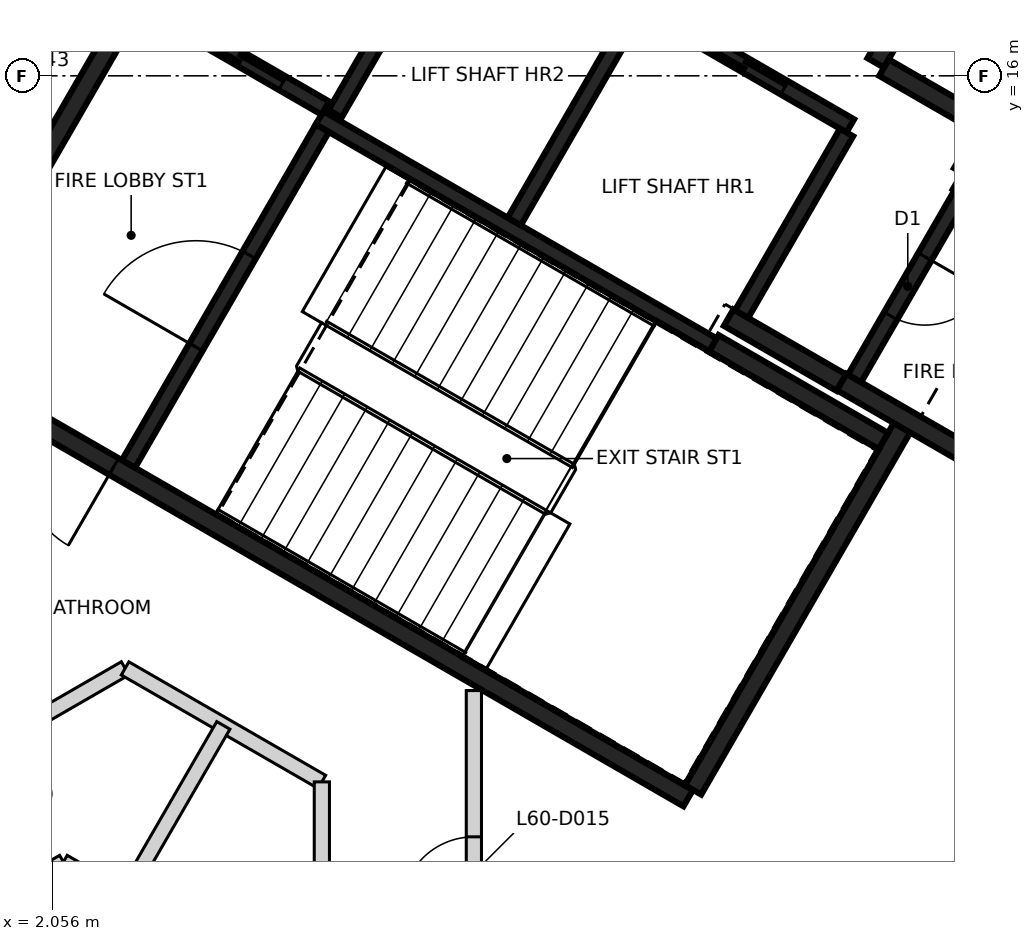
"""IFC4 building model, lengths in metres.
Left out: names, types, materials, properties, quantities, classifications, styles, units other than length and angle.
Written with IfcOpenShell. Run it as: python <this file> out.ifc"""

import sys

from ifc_helpers import new_model, si_unit, direction, frame, frame_2d, origin, place, context, subcontext, project, spatial, rectangle, extrude, element, fill, save


model = new_model("IFC4")
c1 = context("Model", 3, precision=1e-05, world=origin(), true_north=direction((0.0, 1.0)))
c2 = subcontext(c1, "Body", "Model", "MODEL_VIEW")
j1 = project(units=[si_unit("LENGTHUNIT", "METRE"), si_unit("PLANEANGLEUNIT", "RADIAN")], contexts=[c1])
p1 = place(None, origin())
s1 = spatial("IfcSite", under=j1, at=p1, CompositionType="ELEMENT")
p2 = place(p1, origin())
s2 = spatial("IfcBuilding", under=s1, at=p2, CompositionType="ELEMENT")
p3 = place(p2, frame((0.0, 0.0, 239.4)))
s3 = spatial("IfcBuildingStorey", under=s2, at=p3, CompositionType="ELEMENT", Elevation=239.4)
p4 = place(p3, frame((10.42, 6.498, 0.0), z_axis=(0.0, 0.0, 1.0), x_axis=(-0.866021906294, 0.500006057782, 0.0)))
e1 = element("IfcWall", 1, at=p4, inside=s3, PredefinedType="SHEAR", context=c2, shape_type="SweptSolid", body=[
    extrude(rectangle(XDim=11.55, YDim=0.25, at=frame_2d((5.775, 0.0))), origin(), (0.0, 0.0, 1.0), 3.25),
])
p5 = place(p4, frame((10.025, 0.0, 0.0)))
e2 = element("IfcOpeningElement", 2, at=p5, cuts=e1, PredefinedType="OPENING", context=c2, shape_type="SweptSolid", body=[
    extrude(rectangle(XDim=1.2, YDim=2.1, at=frame_2d((0.6, 1.05))), frame((0.0, 0.135, 0.0), z_axis=(0.0, -1.0, 0.0), x_axis=(1.0, 0.0, 0.0)), (0.0, 0.0, 1.0), 0.27),
])
p6 = place(p4, frame((8.725, 0.0, 0.0)))
e3 = element("IfcOpeningElement", 3, at=p6, cuts=e1, PredefinedType="OPENING", context=c2, shape_type="SweptSolid", body=[
    extrude(rectangle(XDim=1.2, YDim=2.1, at=frame_2d((0.6, 1.05))), frame((0.0, 0.135, 0.0), z_axis=(0.0, -1.0, 0.0), x_axis=(1.0, 0.0, 0.0)), (0.0, 0.0, 1.0), 0.27),
])
p7 = place(p3, frame((0.48, 12.381, 0.0), z_axis=(0.0, 0.0, 1.0), x_axis=(0.49999885962, 0.866026062182, 0.0)))
e4 = element("IfcWall", 4, at=p7, inside=s3, PredefinedType="SHEAR", context=c2, shape_type="SweptSolid", body=[
    extrude(rectangle(XDim=5.225, YDim=0.25, at=frame_2d((2.612, 0.0))), origin(), (0.0, 0.0, 1.0), 3.25),
])
p8 = place(p3, frame((13.238, 11.378, 0.0), z_axis=(0.0, 0.0, 1.0), x_axis=(-0.500008851346, -0.866020293397, 0.0)))
e5 = element("IfcWall", 5, at=p8, inside=s3, PredefinedType="SHEAR", context=c2, shape_type="SweptSolid", body=[
    extrude(rectangle(XDim=5.51, YDim=0.25, at=frame_2d((2.755, 0.0))), origin(), (0.0, 0.0, 1.0), 3.25),
])
p9 = place(p3, frame((14.918, 10.54, 0.0), z_axis=(0.0, 0.0, 1.0), x_axis=(-0.866063538972, 0.499933942099, 0.0)))
e6 = element("IfcWall", 6, at=p9, inside=s3, PredefinedType="SHEAR", context=c2, shape_type="SweptSolid", body=[
    extrude(rectangle(XDim=2.865, YDim=0.25, at=frame_2d((1.432, 0.0))), origin(), (0.0, 0.0, 1.0), 3.25),
])
p10 = place(p3, frame((13.963, 14.614, 0.0), z_axis=(0.0, 0.0, 1.0), x_axis=(0.866042235819, -0.499970844928, 0.0)))
e7 = element("IfcWall", 7, at=p10, inside=s3, PredefinedType="SHEAR", context=c2, shape_type="SweptSolid", body=[
    extrude(rectangle(XDim=2.865, YDim=0.25, at=frame_2d((1.432, 0.0))), origin(), (0.0, 0.0, 1.0), 3.25),
])
p11 = place(p3, frame((10.757, 12.481, 0.0), z_axis=(0.0, 0.0, 1.0), x_axis=(0.866022940537, -0.500004266446, 0.0)))
e8 = element("IfcWall", 8, at=p11, inside=s3, PredefinedType="SHEAR", context=c2, shape_type="SweptSolid", body=[
    extrude(rectangle(XDim=2.575, YDim=0.25, at=frame_2d((1.287, 0.0))), origin(), (0.0, 0.0, 1.0), 3.25),
])
p12 = place(p3, frame((13.819, 17.785, 0.0), z_axis=(0.0, 0.0, 1.0), x_axis=(-0.500039802285, -0.866002422705, 0.0)))
e9 = element("IfcWall", 9, at=p12, inside=s3, PredefinedType="SHEAR", context=c2, shape_type="SweptSolid", body=[
    extrude(rectangle(XDim=1.865, YDim=0.25, at=frame_2d((0.932, 0.0))), origin(), (0.0, 0.0, 1.0), 3.25),
])
p13 = place(p3, frame((12.433, 11.964, 0.0), z_axis=(0.0, 0.0, 1.0), x_axis=(-0.866038183914, 0.499977863513, 0.0)))
e10 = element("IfcWall", 10, at=p13, inside=s3, PredefinedType="SHEAR", context=c2, shape_type="SweptSolid", body=[
    extrude(rectangle(XDim=1.71, YDim=0.25, at=frame_2d((0.855, 0.0))), origin(), (0.0, 0.0, 1.0), 3.25),
])
p14 = place(p3, frame((12.995, 16.108, 0.0), z_axis=(0.0, 0.0, 1.0), x_axis=(0.866044474677, -0.49996696679, 0.0)))
e11 = element("IfcWall", 11, at=p14, inside=s3, PredefinedType="SHEAR", context=c2, shape_type="SweptSolid", body=[
    extrude(rectangle(XDim=1.584, YDim=0.25, at=frame_2d((0.792, 0.0))), origin(), (0.0, 0.0, 1.0), 3.25),
])
p15 = place(p3, frame((14.305, 15.207, 0.0), z_axis=(0.0, 0.0, 1.0), x_axis=(-0.499848422343, -0.866112899501, 0.0)))
e12 = element("IfcWall", 12, at=p15, inside=s3, PredefinedType="SHEAR", context=c2, shape_type="SweptSolid", body=[
    extrude(rectangle(XDim=0.559, YDim=0.25, at=frame_2d((0.28, 0.0))), origin(), (0.0, 0.0, 1.0), 3.25),
])
p16 = place(p3, frame((12.552, 15.342, 0.0), z_axis=(0.0, 0.0, 1.0), x_axis=(-0.866030299012, 0.499991521122, 0.0)))
e13 = element("IfcWall", 13, at=p16, inside=s3, PredefinedType="SHEAR", context=c2, shape_type="SweptSolid", body=[
    extrude(rectangle(XDim=6.1, YDim=0.2, at=frame_2d((3.05, 0.0))), origin(), (0.0, 0.0, 1.0), 3.25),
])
p17 = place(p16, frame((1.0, 0.0, 0.0)))
e14 = element("IfcOpeningElement", 14, at=p17, cuts=e13, PredefinedType="OPENING", context=c2, shape_type="SweptSolid", body=[
    extrude(rectangle(XDim=1.2, YDim=2.1, at=frame_2d((0.6, 1.05))), frame((0.0, 0.11, 0.0), z_axis=(0.0, -1.0, 0.0), x_axis=(1.0, 0.0, 0.0)), (0.0, 0.0, 1.0), 0.22),
])
p18 = place(p16, frame((3.982, 0.0, 0.0)))
e15 = element("IfcOpeningElement", 15, at=p18, cuts=e13, PredefinedType="OPENING", context=c2, shape_type="SweptSolid", body=[
    extrude(rectangle(XDim=1.2, YDim=2.1, at=frame_2d((0.6, 1.05))), frame((0.0, 0.11, 0.0), z_axis=(0.0, -1.0, 0.0), x_axis=(1.0, 0.0, 0.0)), (0.0, 0.0, 1.0), 0.22),
])
p19 = place(p3, frame((10.743, 12.46, 0.0), z_axis=(0.0, 0.0, 1.0), x_axis=(-0.866018848283, 0.500011354289, 0.0)))
e16 = element("IfcWall", 16, at=p19, inside=s3, PredefinedType="SHEAR", context=c2, shape_type="SweptSolid", body=[
    extrude(rectangle(XDim=5.974, YDim=0.2, at=frame_2d((2.987, 0.0))), origin(), (0.0, 0.0, 1.0), 3.25),
])
p20 = place(p3, frame((3.057, 10.895, 0.0), z_axis=(0.0, 0.0, 1.0), x_axis=(0.500027839223, 0.866009330205, 0.0)))
e17 = element("IfcWall", 17, at=p20, inside=s3, PredefinedType="SHEAR", context=c2, shape_type="SweptSolid", body=[
    extrude(rectangle(XDim=5.098, YDim=0.2, at=frame_2d((2.549, 0.0))), origin(), (0.0, 0.0, 1.0), 3.25),
])
p21 = place(p20, frame((1.774, 0.0, 0.0)))
e18 = element("IfcOpeningElement", 18, at=p21, cuts=e17, PredefinedType="OPENING", context=c2, shape_type="SweptSolid", body=[
    extrude(rectangle(XDim=1.4, YDim=2.1, at=frame_2d((0.7, 1.05))), frame((0.0, 0.11, 0.0), z_axis=(0.0, -1.0, 0.0), x_axis=(1.0, 0.0, 0.0)), (0.0, 0.0, 1.0), 0.22),
])
p22 = place(p3, frame((8.132, 14.084, 0.0), z_axis=(0.0, 0.0, 1.0), x_axis=(0.500030834389, 0.86600760081, 0.0)))
e19 = element("IfcWall", 19, at=p22, inside=s3, PredefinedType="SHEAR", context=c2, shape_type="SweptSolid", body=[
    extrude(rectangle(XDim=3.198, YDim=0.2, at=frame_2d((1.599, 0.0))), origin(), (0.0, 0.0, 1.0), 3.25),
])
p23 = place(p3, frame((14.008, 14.442, 0.0), z_axis=(0.0, 0.0, 1.0), x_axis=(-0.499986818241, -0.866033014143, 0.0)))
e20 = element("IfcWall", 20, at=p23, inside=s3, PredefinedType="SHEAR", context=c2, shape_type="SweptSolid", body=[
    extrude(rectangle(XDim=2.798, YDim=0.2, at=frame_2d((1.399, 0.0))), origin(), (0.0, 0.0, 1.0), 3.25),
])
p24 = place(p23, frame((0.949, 0.0, 0.0)))
e21 = element("IfcOpeningElement", 21, at=p24, cuts=e20, PredefinedType="OPENING", context=c2, shape_type="SweptSolid", body=[
    extrude(rectangle(XDim=0.9, YDim=2.1, at=frame_2d((0.45, 1.05))), frame((0.0, 0.11, 0.0), z_axis=(0.0, -1.0, 0.0), x_axis=(1.0, 0.0, 0.0)), (0.0, 0.0, 1.0), 0.22),
])
p25 = place(p3, frame((12.502, 15.255, 0.0), z_axis=(0.0, 0.0, 1.0), x_axis=(-0.499965018551, -0.866045599391, 0.0)))
e22 = element("IfcWall", 22, at=p25, inside=s3, PredefinedType="SHEAR", context=c2, shape_type="SweptSolid", body=[
    extrude(rectangle(XDim=2.759, YDim=0.2, at=frame_2d((1.379, 0.0))), origin(), (0.0, 0.0, 1.0), 3.25),
])
p26 = place(p3, frame((7.324, 18.187, 0.0), z_axis=(0.0, 0.0, 1.0), x_axis=(-0.499967891604, -0.866043940782, 0.0)))
e23 = element("IfcWall", 23, at=p26, inside=s3, PredefinedType="SHEAR", context=c2, shape_type="SweptSolid", body=[
    extrude(rectangle(XDim=3.1, YDim=0.2, at=frame_2d((1.55, 0.0))), origin(), (0.0, 0.0, 1.0), 3.25),
])
p27 = place(p3, frame((5.646, 15.576, 0.0), z_axis=(0.0, 0.0, 1.0), x_axis=(-0.866018407898, 0.500012117035, 0.0)))
e24 = element("IfcWall", 24, at=p27, inside=s3, PredefinedType="SHEAR", context=c2, shape_type="SweptSolid", body=[
    extrude(rectangle(XDim=2.651, YDim=0.2, at=frame_2d((1.325, 0.0))), origin(), (0.0, 0.0, 1.0), 3.25),
])
p28 = place(p27, frame((0.652, 0.0, 0.0)))
e25 = element("IfcOpeningElement", 25, at=p28, cuts=e24, PredefinedType="OPENING", context=c2, shape_type="SweptSolid", body=[
    extrude(rectangle(XDim=1.3, YDim=2.1, at=frame_2d((0.65, 1.05))), frame((0.0, 0.11, 0.0), z_axis=(0.0, -1.0, 0.0), x_axis=(1.0, 0.0, 0.0)), (0.0, 0.0, 1.0), 0.22),
])
p29 = place(p3, frame((-8.612, 1.494, 0.0), z_axis=(0.0, 0.0, 1.0), x_axis=(0.8660441356, 0.49996755414, 0.0)))
e26 = element("IfcWall", 26, at=p29, inside=s3, PredefinedType="PARTITIONING", context=c2, shape_type="SweptSolid", body=[
    extrude(rectangle(XDim=13.422, YDim=0.2, at=frame_2d((6.711, 0.0))), origin(), (0.0, 0.0, 1.0), 3.25),
])
p30 = place(p29, frame((9.611, 0.0, 0.0)))
e27 = element("IfcOpeningElement", 27, at=p30, cuts=e26, PredefinedType="OPENING", context=c2, shape_type="SweptSolid", body=[
    extrude(rectangle(XDim=0.9, YDim=2.1, at=frame_2d((0.45, 1.05))), frame((0.0, 0.11, 0.0), z_axis=(0.0, -1.0, 0.0), x_axis=(1.0, 0.0, 0.0)), (0.0, 0.0, 1.0), 0.22),
])
p31 = place(p29, frame((2.911, 0.0, 0.0)))
e28 = element("IfcOpeningElement", 28, at=p31, cuts=e26, PredefinedType="OPENING", context=c2, shape_type="SweptSolid", body=[
    extrude(rectangle(XDim=0.9, YDim=2.1, at=frame_2d((0.45, 1.05))), frame((0.0, 0.11, 0.0), z_axis=(0.0, -1.0, 0.0), x_axis=(1.0, 0.0, 0.0)), (0.0, 0.0, 1.0), 0.22),
])
p32 = place(p3, frame((-1.084, 12.65, 0.0), z_axis=(0.0, 0.0, 1.0), x_axis=(0.492373019537, 0.87038428848, 0.0)))
e29 = element("IfcWall", 29, at=p32, inside=s3, PredefinedType="PARTITIONING", context=c2, shape_type="SweptSolid", body=[
    extrude(rectangle(XDim=8.738, YDim=0.2, at=frame_2d((4.369, 0.0))), origin(), (0.0, 0.0, 1.0), 3.25),
])
p33 = place(p32, frame((5.23, 0.0, 0.0)))
e30 = element("IfcOpeningElement", 30, at=p33, cuts=e29, PredefinedType="OPENING", context=c2, shape_type="SweptSolid", body=[
    extrude(rectangle(XDim=1.0, YDim=2.1, at=frame_2d((0.5, 1.05))), frame((0.0, 0.11, 0.0), z_axis=(0.0, -1.0, 0.0), x_axis=(1.0, 0.0, 0.0)), (0.0, 0.0, 1.0), 0.22),
])
p34 = place(p3, frame((3.011, 8.204, 0.0), z_axis=(0.0, 0.0, 1.0), x_axis=(0.86628077395, -0.499557424812, 0.0)))
e31 = element("IfcWall", 31, at=p34, inside=s3, PredefinedType="PARTITIONING", context=c2, shape_type="SweptSolid", body=[
    extrude(rectangle(XDim=2.989, YDim=0.2, at=frame_2d((1.494, 0.0))), origin(), (0.0, 0.0, 1.0), 3.25),
])
p35 = place(p3, frame((5.6, -6.711, 0.0), z_axis=(0.0, 0.0, 1.0), x_axis=(0.0, 1.0, 0.0)))
e32 = element("IfcWall", 32, at=p35, inside=s3, PredefinedType="PARTITIONING", context=c2, shape_type="SweptSolid", body=[
    extrude(rectangle(XDim=13.422, YDim=0.2, at=frame_2d((6.711, 0.0))), origin(), (0.0, 0.0, 1.0), 3.25),
])
p36 = place(p35, frame((2.912, 0.0, 0.0)))
e33 = element("IfcOpeningElement", 33, at=p36, cuts=e32, PredefinedType="OPENING", context=c2, shape_type="SweptSolid", body=[
    extrude(rectangle(XDim=0.9, YDim=2.1, at=frame_2d((0.45, 1.05))), frame((0.0, 0.11, 0.0), z_axis=(0.0, -1.0, 0.0), x_axis=(1.0, 0.0, 0.0)), (0.0, 0.0, 1.0), 0.22),
])
p37 = place(p35, frame((9.611, 0.0, 0.0)))
e34 = element("IfcOpeningElement", 34, at=p37, cuts=e32, PredefinedType="OPENING", context=c2, shape_type="SweptSolid", body=[
    extrude(rectangle(XDim=0.9, YDim=2.1, at=frame_2d((0.45, 1.05))), frame((0.0, 0.11, 0.0), z_axis=(0.0, -1.0, 0.0), x_axis=(1.0, 0.0, 0.0)), (0.0, 0.0, 1.0), 0.22),
])
p38 = place(p3, frame((7.6, -4.966, 0.0), z_axis=(0.0, 0.0, 1.0), x_axis=(0.0, 1.0, 0.0)))
e35 = element("IfcWall", 35, at=p38, inside=s3, PredefinedType="PARTITIONING", context=c2, shape_type="SweptSolid", body=[
    extrude(rectangle(XDim=12.878, YDim=0.2, at=frame_2d((6.439, 0.0))), origin(), (0.0, 0.0, 1.0), 3.25),
])
p39 = place(p38, frame((10.004, 0.0, 0.0)))
e36 = element("IfcOpeningElement", 36, at=p39, cuts=e35, PredefinedType="OPENING", context=c2, shape_type="SweptSolid", body=[
    extrude(rectangle(XDim=0.95, YDim=2.1, at=frame_2d((0.475, 1.05))), frame((0.0, 0.11, 0.0), z_axis=(0.0, -1.0, 0.0), x_axis=(1.0, 0.0, 0.0)), (0.0, 0.0, 1.0), 0.22),
])
p40 = place(p3, frame((-6.0, 0.924, 0.0), z_axis=(0.0, 0.0, 1.0), x_axis=(0.866012967051, 0.500021540435, 0.0)))
e37 = element("IfcWall", 37, at=p40, inside=s3, PredefinedType="PARTITIONING", context=c2, shape_type="SweptSolid", body=[
    extrude(rectangle(XDim=9.468, YDim=0.2, at=frame_2d((4.734, 0.0))), origin(), (0.0, 0.0, 1.0), 3.25),
])
p41 = place(p3, frame((2.2, 5.658, 0.0), z_axis=(0.0, 0.0, 1.0), x_axis=(0.865818011038, -0.500359042851, 0.0)))
e38 = element("IfcWall", 38, at=p41, inside=s3, PredefinedType="PARTITIONING", context=c2, shape_type="SweptSolid", body=[
    extrude(rectangle(XDim=1.848, YDim=0.2, at=frame_2d((0.924, 0.0))), origin(), (0.0, 0.0, 1.0), 3.25),
])
p42 = place(p3, frame((3.0, 5.196, 0.0), z_axis=(0.0, 0.0, 1.0), x_axis=(0.500076354988, 0.865981315724, 0.0)))
e39 = element("IfcWall", 39, at=p42, inside=s3, PredefinedType="PARTITIONING", context=c2, shape_type="SweptSolid", body=[
    extrude(rectangle(XDim=2.607, YDim=0.2, at=frame_2d((1.304, 0.0))), origin(), (0.0, 0.0, 1.0), 3.25),
])
p43 = place(p28, origin())
e40 = element("IfcDoor", 40, at=p43, inside=s3, OperationType="SLIDING_TO_LEFT", PredefinedType="DOOR", context=c2, shape_type="SweptSolid", body=[
    extrude(rectangle(XDim=1.3, YDim=2.1, at=frame_2d((0.65, 1.05))), frame((0.0, 0.025, 0.0), z_axis=(0.0, -1.0, 0.0), x_axis=(1.0, 0.0, 0.0)), (0.0, 0.0, 1.0), 0.05),
])
fill(e25, e40)
p44 = place(p17, origin())
e41 = element("IfcDoor", 41, at=p44, inside=s3, OperationType="DOUBLE_DOOR_SLIDING", PredefinedType="DOOR", context=c2, shape_type="SweptSolid", body=[
    extrude(rectangle(XDim=1.2, YDim=2.1, at=frame_2d((0.6, 1.05))), frame((0.0, 0.025, 0.0), z_axis=(0.0, -1.0, 0.0), x_axis=(1.0, 0.0, 0.0)), (0.0, 0.0, 1.0), 0.05),
])
fill(e14, e41)
p45 = place(p6, origin())
e42 = element("IfcDoor", 42, at=p45, inside=s3, OperationType="SINGLE_SWING_RIGHT", PredefinedType="DOOR", context=c2, shape_type="SweptSolid", body=[
    extrude(rectangle(XDim=1.2, YDim=2.1, at=frame_2d((0.6, 1.05))), frame((0.0, 0.025, 0.0), z_axis=(0.0, -1.0, 0.0), x_axis=(1.0, 0.0, 0.0)), (0.0, 0.0, 1.0), 0.05),
])
fill(e3, e42)
p46 = place(p21, origin())
e43 = element("IfcDoor", 43, at=p46, inside=s3, OperationType="SINGLE_SWING_LEFT", PredefinedType="DOOR", context=c2, shape_type="SweptSolid", body=[
    extrude(rectangle(XDim=1.4, YDim=2.1, at=frame_2d((0.7, 1.05))), frame((0.0, 0.025, 0.0), z_axis=(0.0, -1.0, 0.0), x_axis=(1.0, 0.0, 0.0)), (0.0, 0.0, 1.0), 0.05),
])
fill(e18, e43)
p47 = place(p24, origin())
e44 = element("IfcDoor", 44, at=p47, inside=s3, OperationType="SINGLE_SWING_RIGHT", PredefinedType="DOOR", context=c2, shape_type="SweptSolid", body=[
    extrude(rectangle(XDim=0.9, YDim=2.1, at=frame_2d((0.45, 1.05))), frame((0.0, 0.025, 0.0), z_axis=(0.0, -1.0, 0.0), x_axis=(1.0, 0.0, 0.0)), (0.0, 0.0, 1.0), 0.05),
])
fill(e21, e44)
p48 = place(p39, frame((0.95, 0.0, 0.0), z_axis=(0.0, 0.0, 1.0), x_axis=(-1.0, 0.0, 0.0)))
e45 = element("IfcDoor", 45, at=p48, inside=s3, OperationType="SINGLE_SWING_LEFT", PredefinedType="DOOR", context=c2, shape_type="SweptSolid", body=[
    extrude(rectangle(XDim=0.95, YDim=2.1, at=frame_2d((0.475, 1.05))), frame((0.0, 0.025, 0.0), z_axis=(0.0, -1.0, 0.0), x_axis=(1.0, 0.0, 0.0)), (0.0, 0.0, 1.0), 0.05),
])
fill(e36, e45)
save(model, sys.argv[1])
